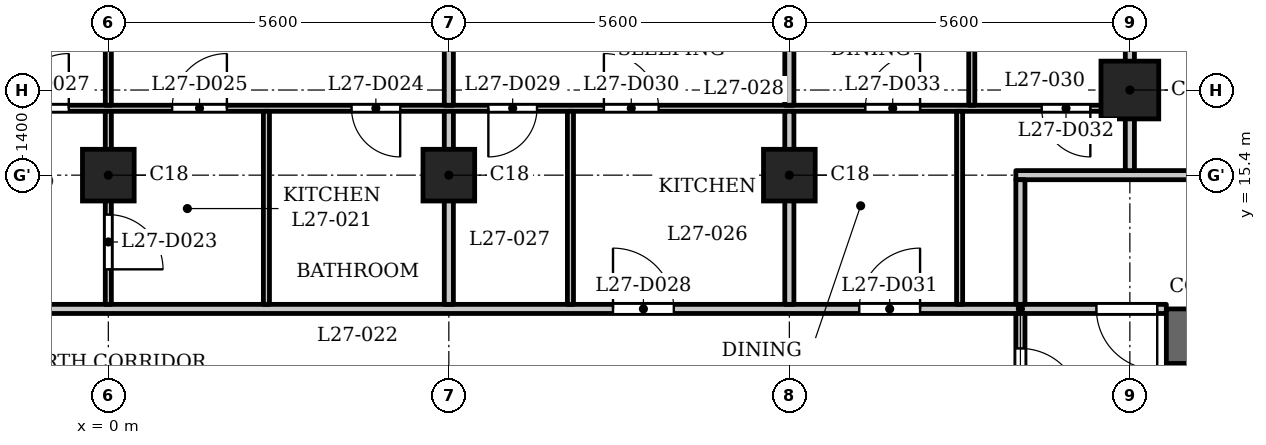
"""IFC4 building model, lengths in metres.
Left out: names, types, materials, properties, quantities, classifications, styles, units other than length and angle.
Written with IfcOpenShell. Run it as: python <this file> out.ifc"""

import sys

from ifc_helpers import new_model, si_unit, direction, frame, frame_2d, origin, origin_2d, place, context, subcontext, project, spatial, rectangle, extrude, element, fill, save


model = new_model("IFC4")
c1 = context("Model", 3, precision=1e-05, world=origin(), true_north=direction((0.0, 1.0)))
c2 = subcontext(c1, "Body", "Model", "MODEL_VIEW")
j1 = project(units=[si_unit("LENGTHUNIT", "METRE"), si_unit("PLANEANGLEUNIT", "RADIAN")], contexts=[c1])
p1 = place(None, origin())
s1 = spatial("IfcSite", under=j1, at=p1, CompositionType="ELEMENT")
p2 = place(p1, origin())
s2 = spatial("IfcBuilding", under=s1, at=p2, CompositionType="ELEMENT")
p3 = place(p2, frame((0.0, 0.0, 107.8)))
s3 = spatial("IfcBuildingStorey", under=s2, at=p3, CompositionType="ELEMENT", Elevation=107.8)
p4 = place(p3, frame((16.8, 16.8, 0.0), z_axis=(0.0, 0.0, 1.0), x_axis=(1.0, 0.0, 0.0)))
e1 = element("IfcColumn", 1, at=p4, inside=s3, PredefinedType="COLUMN", context=c2, shape_type="SweptSolid", body=[
    extrude(rectangle(XDim=0.95, YDim=0.95, at=origin_2d()), origin(), (0.0, 0.0, 1.0), 3.5),
])
for number, where, z_axis, x_axis in (
    (2, (0.0, 15.4, 0.0), (0.0, 0.0, 1.0), (1.0, 0.0, 0.0)),
    (3, (5.6, 15.4, 0.0), (0.0, 0.0, 1.0), (1.0, 0.0, 0.0)),
    (4, (11.2, 15.4, 0.0), (0.0, 0.0, 1.0), (1.0, 0.0, 0.0)),
):
    element("IfcColumn", number, at=place(p3, frame(where, z_axis=z_axis, x_axis=x_axis)), inside=s3, PredefinedType="COLUMN", context=c2, shape_type="SweptSolid", body=[
        extrude(rectangle(XDim=0.85, YDim=0.85, at=origin_2d()), origin(), (0.0, 0.0, 1.0), 3.5),
    ])
p5 = place(p3, frame((17.4, 12.75, 0.0), z_axis=(0.0, 0.0, 1.0), x_axis=(1.0, 0.0, 0.0)))
e5 = element("IfcWall", 5, at=p5, inside=s3, PredefinedType="SHEAR", context=c2, shape_type="SweptSolid", body=[
    extrude(rectangle(XDim=10.4, YDim=0.9, at=frame_2d((5.2, 0.0))), origin(), (0.0, 0.0, 1.0), 3.2),
])
p6 = place(p3, frame((17.6, -12.3, 0.0), z_axis=(0.0, 0.0, 1.0), x_axis=(0.0, 1.0, 0.0)))
e6 = element("IfcWall", 6, at=p6, inside=s3, PredefinedType="SHEAR", context=c2, shape_type="SweptSolid", body=[
    extrude(rectangle(XDim=24.6, YDim=0.4, at=frame_2d((12.3, 0.0))), origin(), (0.0, 0.0, 1.0), 3.2),
])
p7 = place(p6, frame((6.0, 0.0, 0.0)))
e7 = element("IfcOpeningElement", 7, at=p7, cuts=e6, PredefinedType="OPENING", context=c2, shape_type="SweptSolid", body=[
    extrude(rectangle(XDim=1.1, YDim=2.1, at=frame_2d((0.55, 1.05))), frame((0.0, 0.21, 0.0), z_axis=(0.0, -1.0, 0.0), x_axis=(1.0, 0.0, 0.0)), (0.0, 0.0, 1.0), 0.42),
])
p8 = place(p6, frame((8.4, 0.0, 0.0)))
e8 = element("IfcOpeningElement", 8, at=p8, cuts=e6, PredefinedType="OPENING", context=c2, shape_type="SweptSolid", body=[
    extrude(rectangle(XDim=1.1, YDim=2.1, at=frame_2d((0.55, 1.05))), frame((0.0, 0.21, 0.0), z_axis=(0.0, -1.0, 0.0), x_axis=(1.0, 0.0, 0.0)), (0.0, 0.0, 1.0), 0.42),
])
p9 = place(p6, frame((10.8, 0.0, 0.0)))
e9 = element("IfcOpeningElement", 9, at=p9, cuts=e6, PredefinedType="OPENING", context=c2, shape_type="SweptSolid", body=[
    extrude(rectangle(XDim=1.1, YDim=2.1, at=frame_2d((0.55, 1.05))), frame((0.0, 0.21, 0.0), z_axis=(0.0, -1.0, 0.0), x_axis=(1.0, 0.0, 0.0)), (0.0, 0.0, 1.0), 0.42),
])
p10 = place(p6, frame((16.75, 0.0, 0.0)))
e10 = element("IfcOpeningElement", 10, at=p10, cuts=e6, PredefinedType="OPENING", context=c2, shape_type="SweptSolid", body=[
    extrude(rectangle(XDim=0.9, YDim=2.1, at=frame_2d((0.45, 1.05))), frame((0.0, 0.21, 0.0), z_axis=(0.0, -1.0, 0.0), x_axis=(1.0, 0.0, 0.0)), (0.0, 0.0, 1.0), 0.42),
])
p11 = place(p6, frame((22.8, 0.0, 0.0)))
e11 = element("IfcOpeningElement", 11, at=p11, cuts=e6, PredefinedType="OPENING", context=c2, shape_type="SweptSolid", body=[
    extrude(rectangle(XDim=1.1, YDim=2.1, at=frame_2d((0.55, 1.05))), frame((0.0, 0.21, 0.0), z_axis=(0.0, -1.0, 0.0), x_axis=(1.0, 0.0, 0.0)), (0.0, 0.0, 1.0), 0.42),
])
p12 = place(p6, frame((0.7, 0.0, 0.0)))
e12 = element("IfcOpeningElement", 12, at=p12, cuts=e6, PredefinedType="OPENING", context=c2, shape_type="SweptSolid", body=[
    extrude(rectangle(XDim=1.1, YDim=2.1, at=frame_2d((0.55, 1.05))), frame((0.0, 0.21, 0.0), z_axis=(0.0, -1.0, 0.0), x_axis=(1.0, 0.0, 0.0)), (0.0, 0.0, 1.0), 0.42),
])
p13 = place(p6, frame((12.775, 0.0, 0.0)))
e13 = element("IfcOpeningElement", 13, at=p13, cuts=e6, PredefinedType="OPENING", context=c2, shape_type="SweptSolid", body=[
    extrude(rectangle(XDim=1.8, YDim=2.1, at=frame_2d((0.9, 1.05))), frame((0.0, 0.21, 0.0), z_axis=(0.0, -1.0, 0.0), x_axis=(1.0, 0.0, 0.0)), (0.0, 0.0, 1.0), 0.42),
])
p14 = place(p3, frame((-17.4, 13.2, 0.0), z_axis=(0.0, 0.0, 1.0), x_axis=(1.0, 0.0, 0.0)))
e14 = element("IfcWall", 14, at=p14, inside=s3, PredefinedType="PARTITIONING", context=c2, shape_type="SweptSolid", body=[
    extrude(rectangle(XDim=34.8, YDim=0.15, at=frame_2d((17.4, 0.0))), origin(), (0.0, 0.0, 1.0), 3.2),
])
p15 = place(p14, frame((0.25, 0.0, 0.0)))
e15 = element("IfcOpeningElement", 15, at=p15, cuts=e14, PredefinedType="OPENING", context=c2, shape_type="SweptSolid", body=[
    extrude(rectangle(XDim=1.0, YDim=2.1, at=frame_2d((0.5, 1.05))), frame((0.0, 0.085, 0.0), z_axis=(0.0, -1.0, 0.0), x_axis=(1.0, 0.0, 0.0)), (0.0, 0.0, 1.0), 0.17),
])
p16 = place(p14, frame((33.65, 0.0, 0.0)))
e16 = element("IfcOpeningElement", 16, at=p16, cuts=e14, PredefinedType="OPENING", context=c2, shape_type="SweptSolid", body=[
    extrude(rectangle(XDim=1.0, YDim=2.1, at=frame_2d((0.5, 1.05))), frame((0.0, 0.085, 0.0), z_axis=(0.0, -1.0, 0.0), x_axis=(1.0, 0.0, 0.0)), (0.0, 0.0, 1.0), 0.17),
])
p17 = place(p14, frame((4.55, 0.0, 0.0)))
e17 = element("IfcOpeningElement", 17, at=p17, cuts=e14, PredefinedType="OPENING", context=c2, shape_type="SweptSolid", body=[
    extrude(rectangle(XDim=1.0, YDim=2.1, at=frame_2d((0.5, 1.05))), frame((0.0, 0.085, 0.0), z_axis=(0.0, -1.0, 0.0), x_axis=(1.0, 0.0, 0.0)), (0.0, 0.0, 1.0), 0.17),
])
p18 = place(p14, frame((6.85, 0.0, 0.0)))
e18 = element("IfcOpeningElement", 18, at=p18, cuts=e14, PredefinedType="OPENING", context=c2, shape_type="SweptSolid", body=[
    extrude(rectangle(XDim=1.0, YDim=2.1, at=frame_2d((0.5, 1.05))), frame((0.0, 0.085, 0.0), z_axis=(0.0, -1.0, 0.0), x_axis=(1.0, 0.0, 0.0)), (0.0, 0.0, 1.0), 0.17),
])
p19 = place(p14, frame((12.5, 0.0, 0.0)))
e19 = element("IfcOpeningElement", 19, at=p19, cuts=e14, PredefinedType="OPENING", context=c2, shape_type="SweptSolid", body=[
    extrude(rectangle(XDim=1.0, YDim=2.1, at=frame_2d((0.5, 1.05))), frame((0.0, 0.085, 0.0), z_axis=(0.0, -1.0, 0.0), x_axis=(1.0, 0.0, 0.0)), (0.0, 0.0, 1.0), 0.17),
])
p20 = place(p14, frame((25.7, 0.0, 0.0)))
e20 = element("IfcOpeningElement", 20, at=p20, cuts=e14, PredefinedType="OPENING", context=c2, shape_type="SweptSolid", body=[
    extrude(rectangle(XDim=1.0, YDim=2.1, at=frame_2d((0.5, 1.05))), frame((0.0, 0.085, 0.0), z_axis=(0.0, -1.0, 0.0), x_axis=(1.0, 0.0, 0.0)), (0.0, 0.0, 1.0), 0.17),
])
p21 = place(p14, frame((29.75, 0.0, 0.0)))
e21 = element("IfcOpeningElement", 21, at=p21, cuts=e14, PredefinedType="OPENING", context=c2, shape_type="SweptSolid", body=[
    extrude(rectangle(XDim=1.0, YDim=2.1, at=frame_2d((0.5, 1.05))), frame((0.0, 0.085, 0.0), z_axis=(0.0, -1.0, 0.0), x_axis=(1.0, 0.0, 0.0)), (0.0, 0.0, 1.0), 0.17),
])
p22 = place(p3, frame((14.925, 15.4, 0.0), z_axis=(0.0, 0.0, 1.0), x_axis=(1.0, 0.0, 0.0)))
e22 = element("IfcWall", 22, at=p22, inside=s3, PredefinedType="PARTITIONING", context=c2, shape_type="SweptSolid", body=[
    extrude(rectangle(XDim=12.559, YDim=0.15, at=frame_2d((6.279, 0.0))), origin(), (0.0, 0.0, 1.0), 3.2),
])
p23 = place(p22, frame((5.825, 0.0, 0.0)))
e23 = element("IfcOpeningElement", 23, at=p23, cuts=e22, PredefinedType="OPENING", context=c2, shape_type="SweptSolid", body=[
    extrude(rectangle(XDim=1.0, YDim=2.1, at=frame_2d((0.5, 1.05))), frame((0.0, 0.085, 0.0), z_axis=(0.0, -1.0, 0.0), x_axis=(1.0, 0.0, 0.0)), (0.0, 0.0, 1.0), 0.17),
])
p24 = place(p3, frame((-16.725, 16.5, 0.0), z_axis=(0.0, 0.0, 1.0), x_axis=(1.0, 0.0, 0.0)))
e24 = element("IfcWall", 24, at=p24, inside=s3, PredefinedType="PARTITIONING", context=c2, shape_type="SweptSolid", body=[
    extrude(rectangle(XDim=33.45, YDim=0.1, at=frame_2d((16.725, 0.0))), origin(), (0.0, 0.0, 1.0), 3.2),
])
p25 = place(p24, frame((1.075, 0.0, 0.0)))
e25 = element("IfcOpeningElement", 25, at=p25, cuts=e24, PredefinedType="OPENING", context=c2, shape_type="SweptSolid", body=[
    extrude(rectangle(XDim=0.8, YDim=2.1, at=frame_2d((0.4, 1.05))), frame((0.0, 0.06, 0.0), z_axis=(0.0, -1.0, 0.0), x_axis=(1.0, 0.0, 0.0)), (0.0, 0.0, 1.0), 0.12),
])
p26 = place(p24, frame((3.975, 0.0, 0.0)))
e26 = element("IfcOpeningElement", 26, at=p26, cuts=e24, PredefinedType="OPENING", context=c2, shape_type="SweptSolid", body=[
    extrude(rectangle(XDim=0.9, YDim=2.1, at=frame_2d((0.45, 1.05))), frame((0.0, 0.06, 0.0), z_axis=(0.0, -1.0, 0.0), x_axis=(1.0, 0.0, 0.0)), (0.0, 0.0, 1.0), 0.12),
])
p27 = place(p24, frame((8.975, 0.0, 0.0)))
e27 = element("IfcOpeningElement", 27, at=p27, cuts=e24, PredefinedType="OPENING", context=c2, shape_type="SweptSolid", body=[
    extrude(rectangle(XDim=0.8, YDim=2.1, at=frame_2d((0.4, 1.05))), frame((0.0, 0.06, 0.0), z_axis=(0.0, -1.0, 0.0), x_axis=(1.0, 0.0, 0.0)), (0.0, 0.0, 1.0), 0.12),
])
p28 = place(p24, frame((6.325, 0.0, 0.0)))
e28 = element("IfcOpeningElement", 28, at=p28, cuts=e24, PredefinedType="OPENING", context=c2, shape_type="SweptSolid", body=[
    extrude(rectangle(XDim=0.9, YDim=2.1, at=frame_2d((0.45, 1.05))), frame((0.0, 0.06, 0.0), z_axis=(0.0, -1.0, 0.0), x_axis=(1.0, 0.0, 0.0)), (0.0, 0.0, 1.0), 0.12),
])
p29 = place(p24, frame((20.725, 0.0, 0.0)))
e29 = element("IfcOpeningElement", 29, at=p29, cuts=e24, PredefinedType="OPENING", context=c2, shape_type="SweptSolid", body=[
    extrude(rectangle(XDim=0.8, YDim=2.1, at=frame_2d((0.4, 1.05))), frame((0.0, 0.06, 0.0), z_axis=(0.0, -1.0, 0.0), x_axis=(1.0, 0.0, 0.0)), (0.0, 0.0, 1.0), 0.12),
])
p30 = place(p24, frame((17.775, 0.0, 0.0)))
e30 = element("IfcOpeningElement", 30, at=p30, cuts=e24, PredefinedType="OPENING", context=c2, shape_type="SweptSolid", body=[
    extrude(rectangle(XDim=0.9, YDim=2.1, at=frame_2d((0.45, 1.05))), frame((0.0, 0.06, 0.0), z_axis=(0.0, -1.0, 0.0), x_axis=(1.0, 0.0, 0.0)), (0.0, 0.0, 1.0), 0.12),
])
p31 = place(p24, frame((11.825, 0.0, 0.0)))
e31 = element("IfcOpeningElement", 31, at=p31, cuts=e24, PredefinedType="OPENING", context=c2, shape_type="SweptSolid", body=[
    extrude(rectangle(XDim=0.9, YDim=2.1, at=frame_2d((0.45, 1.05))), frame((0.0, 0.06, 0.0), z_axis=(0.0, -1.0, 0.0), x_axis=(1.0, 0.0, 0.0)), (0.0, 0.0, 1.0), 0.12),
])
p32 = place(p24, frame((15.175, 0.0, 0.0)))
e32 = element("IfcOpeningElement", 32, at=p32, cuts=e24, PredefinedType="OPENING", context=c2, shape_type="SweptSolid", body=[
    extrude(rectangle(XDim=0.9, YDim=2.1, at=frame_2d((0.45, 1.05))), frame((0.0, 0.06, 0.0), z_axis=(0.0, -1.0, 0.0), x_axis=(1.0, 0.0, 0.0)), (0.0, 0.0, 1.0), 0.12),
])
p33 = place(p24, frame((22.975, 0.0, 0.0)))
e33 = element("IfcOpeningElement", 33, at=p33, cuts=e24, PredefinedType="OPENING", context=c2, shape_type="SweptSolid", body=[
    extrude(rectangle(XDim=0.8, YDim=2.1, at=frame_2d((0.4, 1.05))), frame((0.0, 0.06, 0.0), z_axis=(0.0, -1.0, 0.0), x_axis=(1.0, 0.0, 0.0)), (0.0, 0.0, 1.0), 0.12),
])
p34 = place(p24, frame((24.875, 0.0, 0.0)))
e34 = element("IfcOpeningElement", 34, at=p34, cuts=e24, PredefinedType="OPENING", context=c2, shape_type="SweptSolid", body=[
    extrude(rectangle(XDim=0.9, YDim=2.1, at=frame_2d((0.45, 1.05))), frame((0.0, 0.06, 0.0), z_axis=(0.0, -1.0, 0.0), x_axis=(1.0, 0.0, 0.0)), (0.0, 0.0, 1.0), 0.12),
])
p35 = place(p24, frame((32.075, 0.0, 0.0)))
e35 = element("IfcOpeningElement", 35, at=p35, cuts=e24, PredefinedType="OPENING", context=c2, shape_type="SweptSolid", body=[
    extrude(rectangle(XDim=0.8, YDim=2.1, at=frame_2d((0.4, 1.05))), frame((0.0, 0.06, 0.0), z_axis=(0.0, -1.0, 0.0), x_axis=(1.0, 0.0, 0.0)), (0.0, 0.0, 1.0), 0.12),
])
p36 = place(p24, frame((29.175, 0.0, 0.0)))
e36 = element("IfcOpeningElement", 36, at=p36, cuts=e24, PredefinedType="OPENING", context=c2, shape_type="SweptSolid", body=[
    extrude(rectangle(XDim=0.9, YDim=2.1, at=frame_2d((0.45, 1.05))), frame((0.0, 0.06, 0.0), z_axis=(0.0, -1.0, 0.0), x_axis=(1.0, 0.0, 0.0)), (0.0, 0.0, 1.0), 0.12),
])
p37 = place(p3, frame((0.0, 13.275, 0.0), z_axis=(0.0, 0.0, 1.0), x_axis=(0.0, 1.0, 0.0)))
e37 = element("IfcWall", 37, at=p37, inside=s3, PredefinedType="PARTITIONING", context=c2, shape_type="SweptSolid", body=[
    extrude(rectangle(XDim=3.175, YDim=0.1, at=frame_2d((1.587, 0.0))), origin(), (0.0, 0.0, 1.0), 3.2),
])
p38 = place(p37, frame((0.576, 0.0, 0.0)))
e38 = element("IfcOpeningElement", 38, at=p38, cuts=e37, PredefinedType="OPENING", context=c2, shape_type="SweptSolid", body=[
    extrude(rectangle(XDim=0.9, YDim=2.1, at=frame_2d((0.45, 1.05))), frame((0.0, 0.06, 0.0), z_axis=(0.0, -1.0, 0.0), x_axis=(1.0, 0.0, 0.0)), (0.0, 0.0, 1.0), 0.12),
])
p39 = place(p3, frame((0.0, 16.55, 0.0), z_axis=(0.0, 0.0, 1.0), x_axis=(0.0, 1.0, 0.0)))
e39 = element("IfcWall", 39, at=p39, inside=s3, PredefinedType="PARTITIONING", context=c2, shape_type="SweptSolid", body=[
    extrude(rectangle(XDim=6.43, YDim=0.1, at=frame_2d((3.215, 0.0))), origin(), (0.0, 0.0, 1.0), 3.2),
])
p40 = place(p3, frame((2.6, 13.275, 0.0), z_axis=(0.0, 0.0, 1.0), x_axis=(0.0, 1.0, 0.0)))
e40 = element("IfcWall", 40, at=p40, inside=s3, PredefinedType="PARTITIONING", context=c2, shape_type="SweptSolid", body=[
    extrude(rectangle(XDim=3.175, YDim=0.1, at=frame_2d((1.587, 0.0))), origin(), (0.0, 0.0, 1.0), 3.2),
])
p41 = place(p3, frame((5.6, 13.275, 0.0), z_axis=(0.0, 0.0, 1.0), x_axis=(0.0, 1.0, 0.0)))
e41 = element("IfcWall", 41, at=p41, inside=s3, PredefinedType="PARTITIONING", context=c2, shape_type="SweptSolid", body=[
    extrude(rectangle(XDim=3.175, YDim=0.15, at=frame_2d((1.587, 0.0))), origin(), (0.0, 0.0, 1.0), 3.2),
])
p42 = place(p3, frame((5.6, 16.55, 0.0), z_axis=(0.0, 0.0, 1.0), x_axis=(0.0, 1.0, 0.0)))
e42 = element("IfcWall", 42, at=p42, inside=s3, PredefinedType="PARTITIONING", context=c2, shape_type="SweptSolid", body=[
    extrude(rectangle(XDim=6.43, YDim=0.15, at=frame_2d((3.215, 0.0))), origin(), (0.0, 0.0, 1.0), 3.2),
])
p43 = place(p3, frame((7.6, 13.275, 0.0), z_axis=(0.0, 0.0, 1.0), x_axis=(0.0, 1.0, 0.0)))
e43 = element("IfcWall", 43, at=p43, inside=s3, PredefinedType="PARTITIONING", context=c2, shape_type="SweptSolid", body=[
    extrude(rectangle(XDim=3.175, YDim=0.1, at=frame_2d((1.587, 0.0))), origin(), (0.0, 0.0, 1.0), 3.2),
])
p44 = place(p3, frame((11.2, 13.275, 0.0), z_axis=(0.0, 0.0, 1.0), x_axis=(0.0, 1.0, 0.0)))
e44 = element("IfcWall", 44, at=p44, inside=s3, PredefinedType="PARTITIONING", context=c2, shape_type="SweptSolid", body=[
    extrude(rectangle(XDim=3.175, YDim=0.15, at=frame_2d((1.587, 0.0))), origin(), (0.0, 0.0, 1.0), 3.2),
])
p45 = place(p3, frame((11.2, 16.55, 0.0), z_axis=(0.0, 0.0, 1.0), x_axis=(0.0, 1.0, 0.0)))
e45 = element("IfcWall", 45, at=p45, inside=s3, PredefinedType="PARTITIONING", context=c2, shape_type="SweptSolid", body=[
    extrude(rectangle(XDim=6.43, YDim=0.15, at=frame_2d((3.215, 0.0))), origin(), (0.0, 0.0, 1.0), 3.2),
])
p46 = place(p3, frame((14.0, 13.275, 0.0), z_axis=(0.0, 0.0, 1.0), x_axis=(0.0, 1.0, 0.0)))
e46 = element("IfcWall", 46, at=p46, inside=s3, PredefinedType="PARTITIONING", context=c2, shape_type="SweptSolid", body=[
    extrude(rectangle(XDim=3.175, YDim=0.1, at=frame_2d((1.587, 0.0))), origin(), (0.0, 0.0, 1.0), 3.2),
])
p47 = place(p3, frame((14.2, 16.55, 0.0), z_axis=(0.0, 0.0, 1.0), x_axis=(0.0, 1.0, 0.0)))
e47 = element("IfcWall", 47, at=p47, inside=s3, PredefinedType="PARTITIONING", context=c2, shape_type="SweptSolid", body=[
    extrude(rectangle(XDim=5.53, YDim=0.1, at=frame_2d((2.765, 0.0))), origin(), (0.0, 0.0, 1.0), 3.2),
])
p48 = place(p47, frame((4.35, 0.0, 0.0)))
e48 = element("IfcOpeningElement", 48, at=p48, cuts=e47, PredefinedType="OPENING", context=c2, shape_type="SweptSolid", body=[
    extrude(rectangle(XDim=0.9, YDim=2.1, at=frame_2d((0.45, 1.05))), frame((0.0, 0.06, 0.0), z_axis=(0.0, -1.0, 0.0), x_axis=(1.0, 0.0, 0.0)), (0.0, 0.0, 1.0), 0.12),
])
p49 = place(p3, frame((15.0, 6.769, 0.0), z_axis=(0.0, 0.0, 1.0), x_axis=(0.0, 1.0, 0.0)))
e49 = element("IfcWall", 49, at=p49, inside=s3, PredefinedType="PARTITIONING", context=c2, shape_type="SweptSolid", body=[
    extrude(rectangle(XDim=6.356, YDim=0.15, at=frame_2d((3.178, 0.0))), origin(), (0.0, 0.0, 1.0), 3.2),
])
p50 = place(p49, frame((4.781, 0.0, 0.0)))
e50 = element("IfcOpeningElement", 50, at=p50, cuts=e49, PredefinedType="OPENING", context=c2, shape_type="SweptSolid", body=[
    extrude(rectangle(XDim=1.0, YDim=2.1, at=frame_2d((0.5, 1.05))), frame((0.0, 0.085, 0.0), z_axis=(0.0, -1.0, 0.0), x_axis=(1.0, 0.0, 0.0)), (0.0, 0.0, 1.0), 0.17),
])
p51 = place(p3, frame((15.0, 13.275, 0.0), z_axis=(0.0, 0.0, 1.0), x_axis=(0.0, 1.0, 0.0)))
e51 = element("IfcWall", 51, at=p51, inside=s3, PredefinedType="PARTITIONING", context=c2, shape_type="SweptSolid", body=[
    extrude(rectangle(XDim=2.05, YDim=0.15, at=frame_2d((1.025, 0.0))), origin(), (0.0, 0.0, 1.0), 3.2),
])
p52 = place(p3, frame((16.8, 15.475, 0.0), z_axis=(0.0, 0.0, 1.0), x_axis=(0.0, 1.0, 0.0)))
e52 = element("IfcWall", 52, at=p52, inside=s3, PredefinedType="PARTITIONING", context=c2, shape_type="SweptSolid", body=[
    extrude(rectangle(XDim=7.505, YDim=0.15, at=frame_2d((3.752, 0.0))), origin(), (0.0, 0.0, 1.0), 3.2),
])
p53 = place(p50, origin())
e53 = element("IfcDoor", 53, at=p53, inside=s3, OperationType="SINGLE_SWING_LEFT", PredefinedType="DOOR", context=c2, shape_type="SweptSolid", body=[
    extrude(rectangle(XDim=1.0, YDim=2.1, at=frame_2d((0.5, 1.05))), frame((0.0, 0.025, 0.0), z_axis=(0.0, -1.0, 0.0), x_axis=(1.0, 0.0, 0.0)), (0.0, 0.0, 1.0), 0.05),
])
fill(e50, e53)
p54 = place(p16, origin())
e54 = element("IfcDoor", 54, at=p54, inside=s3, OperationType="SINGLE_SWING_RIGHT", PredefinedType="DOOR", context=c2, shape_type="SweptSolid", body=[
    extrude(rectangle(XDim=1.0, YDim=2.1, at=frame_2d((0.5, 1.05))), frame((0.0, 0.025, 0.0), z_axis=(0.0, -1.0, 0.0), x_axis=(1.0, 0.0, 0.0)), (0.0, 0.0, 1.0), 0.05),
])
fill(e16, e54)
p55 = place(p38, origin())
e55 = element("IfcDoor", 55, at=p55, inside=s3, OperationType="SINGLE_SWING_LEFT", PredefinedType="DOOR", context=c2, shape_type="SweptSolid", body=[
    extrude(rectangle(XDim=0.9, YDim=2.1, at=frame_2d((0.45, 1.05))), frame((0.0, 0.025, 0.0), z_axis=(0.0, -1.0, 0.0), x_axis=(1.0, 0.0, 0.0)), (0.0, 0.0, 1.0), 0.05),
])
fill(e38, e55)
p56 = place(p29, origin())
e56 = element("IfcDoor", 56, at=p56, inside=s3, OperationType="SINGLE_SWING_RIGHT", PredefinedType="DOOR", context=c2, shape_type="SweptSolid", body=[
    extrude(rectangle(XDim=0.8, YDim=2.1, at=frame_2d((0.4, 1.05))), frame((0.0, 0.025, 0.0), z_axis=(0.0, -1.0, 0.0), x_axis=(1.0, 0.0, 0.0)), (0.0, 0.0, 1.0), 0.05),
])
fill(e29, e56)
p57 = place(p30, origin())
e57 = element("IfcDoor", 57, at=p57, inside=s3, OperationType="SINGLE_SWING_LEFT", PredefinedType="DOOR", context=c2, shape_type="SweptSolid", body=[
    extrude(rectangle(XDim=0.9, YDim=2.1, at=frame_2d((0.45, 1.05))), frame((0.0, 0.025, 0.0), z_axis=(0.0, -1.0, 0.0), x_axis=(1.0, 0.0, 0.0)), (0.0, 0.0, 1.0), 0.05),
])
fill(e30, e57)
p58 = place(p32, origin())
e58 = element("IfcDoor", 58, at=p58, inside=s3, OperationType="SINGLE_SWING_LEFT", PredefinedType="DOOR", context=c2, shape_type="SweptSolid", body=[
    extrude(rectangle(XDim=0.9, YDim=2.1, at=frame_2d((0.45, 1.05))), frame((0.0, 0.025, 0.0), z_axis=(0.0, -1.0, 0.0), x_axis=(1.0, 0.0, 0.0)), (0.0, 0.0, 1.0), 0.05),
])
fill(e32, e58)
p59 = place(p20, origin())
e59 = element("IfcDoor", 59, at=p59, inside=s3, OperationType="SINGLE_SWING_RIGHT", PredefinedType="DOOR", context=c2, shape_type="SweptSolid", body=[
    extrude(rectangle(XDim=1.0, YDim=2.1, at=frame_2d((0.5, 1.05))), frame((0.0, 0.025, 0.0), z_axis=(0.0, -1.0, 0.0), x_axis=(1.0, 0.0, 0.0)), (0.0, 0.0, 1.0), 0.05),
])
fill(e20, e59)
p60 = place(p33, origin())
e60 = element("IfcDoor", 60, at=p60, inside=s3, OperationType="SINGLE_SWING_LEFT", PredefinedType="DOOR", context=c2, shape_type="SweptSolid", body=[
    extrude(rectangle(XDim=0.8, YDim=2.1, at=frame_2d((0.4, 1.05))), frame((0.0, 0.025, 0.0), z_axis=(0.0, -1.0, 0.0), x_axis=(1.0, 0.0, 0.0)), (0.0, 0.0, 1.0), 0.05),
])
fill(e33, e60)
p61 = place(p34, origin())
e61 = element("IfcDoor", 61, at=p61, inside=s3, OperationType="SINGLE_SWING_RIGHT", PredefinedType="DOOR", context=c2, shape_type="SweptSolid", body=[
    extrude(rectangle(XDim=0.9, YDim=2.1, at=frame_2d((0.45, 1.05))), frame((0.0, 0.025, 0.0), z_axis=(0.0, -1.0, 0.0), x_axis=(1.0, 0.0, 0.0)), (0.0, 0.0, 1.0), 0.05),
])
fill(e34, e61)
p62 = place(p21, origin())
e62 = element("IfcDoor", 62, at=p62, inside=s3, OperationType="SINGLE_SWING_LEFT", PredefinedType="DOOR", context=c2, shape_type="SweptSolid", body=[
    extrude(rectangle(XDim=1.0, YDim=2.1, at=frame_2d((0.5, 1.05))), frame((0.0, 0.025, 0.0), z_axis=(0.0, -1.0, 0.0), x_axis=(1.0, 0.0, 0.0)), (0.0, 0.0, 1.0), 0.05),
])
fill(e21, e62)
p63 = place(p35, origin())
e63 = element("IfcDoor", 63, at=p63, inside=s3, OperationType="SINGLE_SWING_RIGHT", PredefinedType="DOOR", context=c2, shape_type="SweptSolid", body=[
    extrude(rectangle(XDim=0.8, YDim=2.1, at=frame_2d((0.4, 1.05))), frame((0.0, 0.025, 0.0), z_axis=(0.0, -1.0, 0.0), x_axis=(1.0, 0.0, 0.0)), (0.0, 0.0, 1.0), 0.05),
])
fill(e35, e63)
p64 = place(p36, origin())
e64 = element("IfcDoor", 64, at=p64, inside=s3, OperationType="SINGLE_SWING_LEFT", PredefinedType="DOOR", context=c2, shape_type="SweptSolid", body=[
    extrude(rectangle(XDim=0.9, YDim=2.1, at=frame_2d((0.45, 1.05))), frame((0.0, 0.025, 0.0), z_axis=(0.0, -1.0, 0.0), x_axis=(1.0, 0.0, 0.0)), (0.0, 0.0, 1.0), 0.05),
])
fill(e36, e64)
save(model, sys.argv[1])
